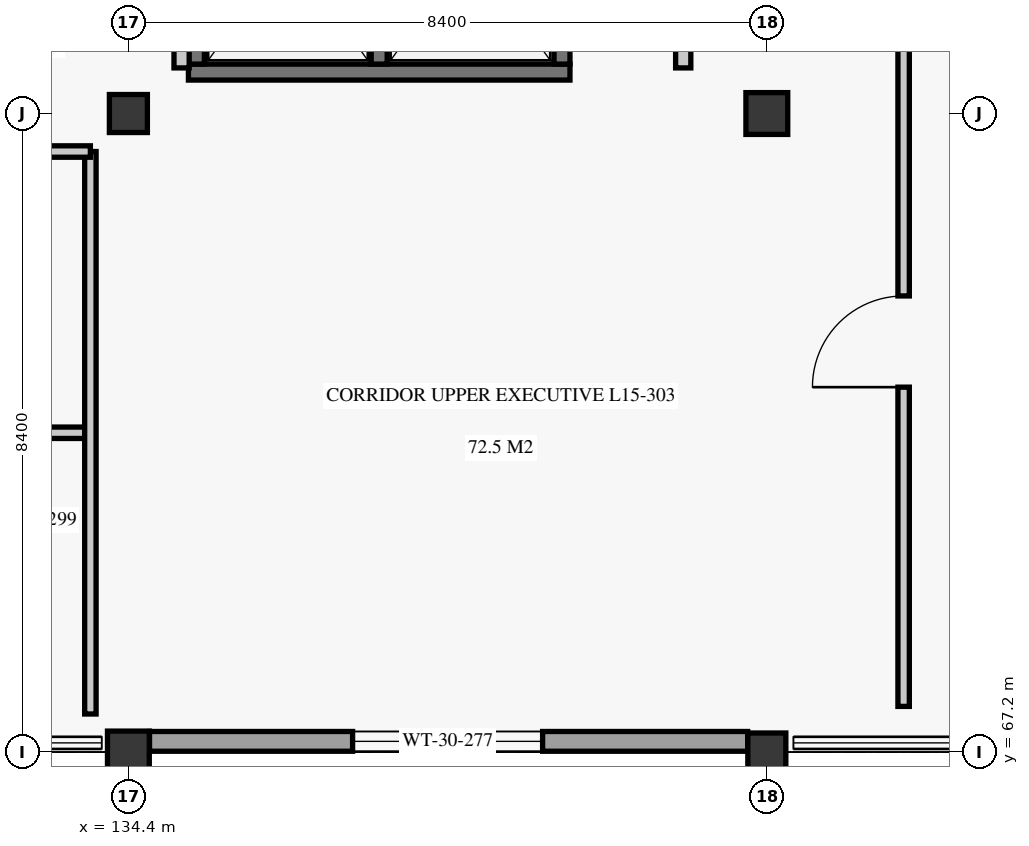
"""IFC4 building model, lengths in metres.
Left out: names, types, materials, properties, quantities, classifications, styles, units other than length and angle.
Written with IfcOpenShell. Run it as: python <this file> out.ifc"""

import sys

from ifc_helpers import new_model, si_unit, direction, frame, frame_2d, origin, origin_2d, place, context, subcontext, project, spatial, rectangle, extrude, element, fill, save


model = new_model("IFC4")
c1 = context("Model", 3, precision=1e-05, world=origin(), true_north=direction((0.0, 1.0)))
c2 = subcontext(c1, "Body", "Model", "MODEL_VIEW")
j1 = project(units=[si_unit("LENGTHUNIT", "METRE"), si_unit("PLANEANGLEUNIT", "RADIAN")], contexts=[c1])
p1 = place(None, origin())
s1 = spatial("IfcSite", under=j1, at=p1, CompositionType="ELEMENT")
p2 = place(p1, origin())
s2 = spatial("IfcBuilding", under=s1, at=p2, CompositionType="ELEMENT")
p3 = place(p2, frame((0.0, 0.0, 62.7)))
s3 = spatial("IfcBuildingStorey", under=s2, at=p3, CompositionType="ELEMENT", Elevation=62.7)
p4 = place(p3, frame((134.4, 67.2, 0.0), z_axis=(0.0, 0.0, 1.0), x_axis=(1.0, 0.0, 0.0)))
e1 = element("IfcColumn", 1, at=p4, inside=s3, PredefinedType="COLUMN", context=c2, shape_type="SweptSolid", body=[
    extrude(rectangle(XDim=0.55, YDim=0.55, at=origin_2d()), origin(), (0.0, 0.0, 1.0), 3.72),
])
for number, where, z_axis, x_axis in (
    (2, (134.4, 75.6, 0.0), (0.0, 0.0, 1.0), (1.0, 0.0, 0.0)),
    (3, (142.8, 67.2, 0.0), (0.0, 0.0, 1.0), (1.0, 0.0, 0.0)),
):
    element("IfcColumn", number, at=place(p3, frame(where, z_axis=z_axis, x_axis=x_axis)), inside=s3, PredefinedType="COLUMN", context=c2, shape_type="SweptSolid", body=[
        extrude(rectangle(XDim=0.5, YDim=0.5, at=origin_2d()), origin(), (0.0, 0.0, 1.0), 3.72),
    ])
p5 = place(p3, frame((142.8, 75.6, 0.0), z_axis=(0.0, 0.0, 1.0), x_axis=(1.0, 0.0, 0.0)))
e4 = element("IfcColumn", 4, at=p5, inside=s3, PredefinedType="COLUMN", context=c2, shape_type="SweptSolid", body=[
    extrude(rectangle(XDim=0.55, YDim=0.55, at=origin_2d()), origin(), (0.0, 0.0, 1.0), 3.72),
])
p6 = place(p3, frame((134.678, 67.34, 0.0), z_axis=(0.0, 0.0, 1.0), x_axis=(1.0, 0.0, 0.0)))
e5 = element("IfcWall", 5, at=p6, inside=s3, PredefinedType="SOLIDWALL", context=c2, shape_type="SweptSolid", body=[
    extrude(rectangle(XDim=7.87, YDim=0.26, at=frame_2d((3.935, 0.0))), origin(), (0.0, 0.0, 1.0), 3.04),
])
p7 = place(p6, frame((2.672, 0.0, 0.85)))
e6 = element("IfcOpeningElement", 6, at=p7, cuts=e5, PredefinedType="OPENING", context=c2, shape_type="SweptSolid", body=[
    extrude(rectangle(XDim=2.5, YDim=1.8, at=frame_2d((1.25, 0.9))), frame((0.0, 0.14, 0.0), z_axis=(0.0, -1.0, 0.0), x_axis=(1.0, 0.0, 0.0)), (0.0, 0.0, 1.0), 0.28),
])
p8 = place(p3, frame((135.19, 76.145, 0.0), z_axis=(0.0, 0.0, 1.0), x_axis=(1.0, 0.0, 0.0)))
e7 = element("IfcWall", 7, at=p8, inside=s3, PredefinedType="SHEAR", context=c2, shape_type="SweptSolid", body=[
    extrude(rectangle(XDim=5.02, YDim=0.21, at=frame_2d((2.51, 0.0))), origin(), (0.0, 0.0, 1.0), 3.72),
])
for number, where, z_axis, x_axis in (
    (8, (135.295, 76.25, 0.0), (0.0, 0.0, 1.0), (0.0, 1.0, 0.0)),
    (9, (140.105, 76.25, 0.0), (0.0, 0.0, 1.0), (0.0, 1.0, 0.0)),
    (10, (137.7, 76.25, 0.0), (0.0, 0.0, 1.0), (0.0, 1.0, 0.0)),
):
    element("IfcWall", number, at=place(p3, frame(where, z_axis=z_axis, x_axis=x_axis)), inside=s3, PredefinedType="SHEAR", context=c2, shape_type="SweptSolid", body=[
        extrude(rectangle(XDim=3.0, YDim=0.21, at=frame_2d((1.5, 0.0))), origin(), (0.0, 0.0, 1.0), 3.72),
    ])
for number, where, z_axis, x_axis in (
    (11, (135.1, 76.2, 0.0), (0.0, 0.0, 1.0), (0.0, 1.0, 0.0)),
    (12, (141.7, 76.2, 0.0), (0.0, 0.0, 1.0), (0.0, 1.0, 0.0)),
):
    element("IfcWall", number, at=place(p3, frame(where, z_axis=z_axis, x_axis=x_axis)), inside=s3, PredefinedType="PARTITIONING", context=c2, shape_type="SweptSolid", body=[
        extrude(rectangle(XDim=7.25, YDim=0.2, at=frame_2d((3.625, 0.0))), origin(), (0.0, 0.0, 1.0), 3.34),
    ])
p9 = place(p3, frame((129.1, 71.4, 0.0), z_axis=(0.0, 0.0, 1.0), x_axis=(1.0, 0.0, 0.0)))
e13 = element("IfcWall", 13, at=p9, inside=s3, PredefinedType="PARTITIONING", context=c2, shape_type="SweptSolid", body=[
    extrude(rectangle(XDim=4.8, YDim=0.15, at=frame_2d((2.4, 0.0))), origin(), (0.0, 0.0, 1.0), 3.34),
])
p10 = place(p3, frame((133.9, 67.7, 0.0), z_axis=(0.0, 0.0, 1.0), x_axis=(0.0, 1.0, 0.0)))
e14 = element("IfcWall", 14, at=p10, inside=s3, PredefinedType="PARTITIONING", context=c2, shape_type="SweptSolid", body=[
    extrude(rectangle(XDim=7.4, YDim=0.15, at=frame_2d((3.7, 0.0))), origin(), (0.0, 0.0, 1.0), 3.34),
])
p11 = place(p3, frame((129.1, 75.1, 0.0), z_axis=(0.0, 0.0, 1.0), x_axis=(1.0, 0.0, 0.0)))
e15 = element("IfcWall", 15, at=p11, inside=s3, PredefinedType="PARTITIONING", context=c2, shape_type="SweptSolid", body=[
    extrude(rectangle(XDim=4.8, YDim=0.15, at=frame_2d((2.4, 0.0))), origin(), (0.0, 0.0, 1.0), 3.34),
])
p12 = place(p3, frame((144.6, 67.8, 0.0), z_axis=(0.0, 0.0, 1.0), x_axis=(0.0, 1.0, 0.0)))
e16 = element("IfcWall", 16, at=p12, inside=s3, PredefinedType="PARTITIONING", context=c2, shape_type="SweptSolid", body=[
    extrude(rectangle(XDim=24.2, YDim=0.15, at=frame_2d((12.1, 0.0))), origin(), (0.0, 0.0, 1.0), 3.34),
])
p13 = place(p12, frame((4.2, 0.0, 0.0)))
e17 = element("IfcOpeningElement", 17, at=p13, cuts=e16, PredefinedType="OPENING", context=c2, shape_type="SweptSolid", body=[
    extrude(rectangle(XDim=1.2, YDim=2.3, at=frame_2d((0.6, 1.15))), frame((0.0, 0.085, 0.0), z_axis=(0.0, -1.0, 0.0), x_axis=(1.0, 0.0, 0.0)), (0.0, 0.0, 1.0), 0.17),
])
p14 = place(p12, frame((19.6, 0.0, 0.0)))
e18 = element("IfcOpeningElement", 18, at=p14, cuts=e16, PredefinedType="OPENING", context=c2, shape_type="SweptSolid", body=[
    extrude(rectangle(XDim=1.2, YDim=2.3, at=frame_2d((0.6, 1.15))), frame((0.0, 0.085, 0.0), z_axis=(0.0, -1.0, 0.0), x_axis=(1.0, 0.0, 0.0)), (0.0, 0.0, 1.0), 0.17),
])
p15 = place(p7, origin())
e19 = element("IfcWindow", 19, at=p15, inside=s3, PartitioningType="SINGLE_PANEL", PredefinedType="WINDOW", context=c2, shape_type="SweptSolid", body=[
    extrude(rectangle(XDim=2.5, YDim=1.8, at=frame_2d((1.25, 0.9))), frame((0.0, 0.03, 0.0), z_axis=(0.0, -1.0, 0.0), x_axis=(1.0, 0.0, 0.0)), (0.0, 0.0, 1.0), 0.06),
])
fill(e6, e19)
p16 = place(p13, origin())
e20 = element("IfcDoor", 20, at=p16, inside=s3, OperationType="SINGLE_SWING_LEFT", PredefinedType="DOOR", context=c2, shape_type="SweptSolid", body=[
    extrude(rectangle(XDim=1.2, YDim=2.3, at=frame_2d((0.6, 1.15))), frame((0.0, 0.025, 0.0), z_axis=(0.0, -1.0, 0.0), x_axis=(1.0, 0.0, 0.0)), (0.0, 0.0, 1.0), 0.05),
])
fill(e17, e20)
save(model, sys.argv[1])
